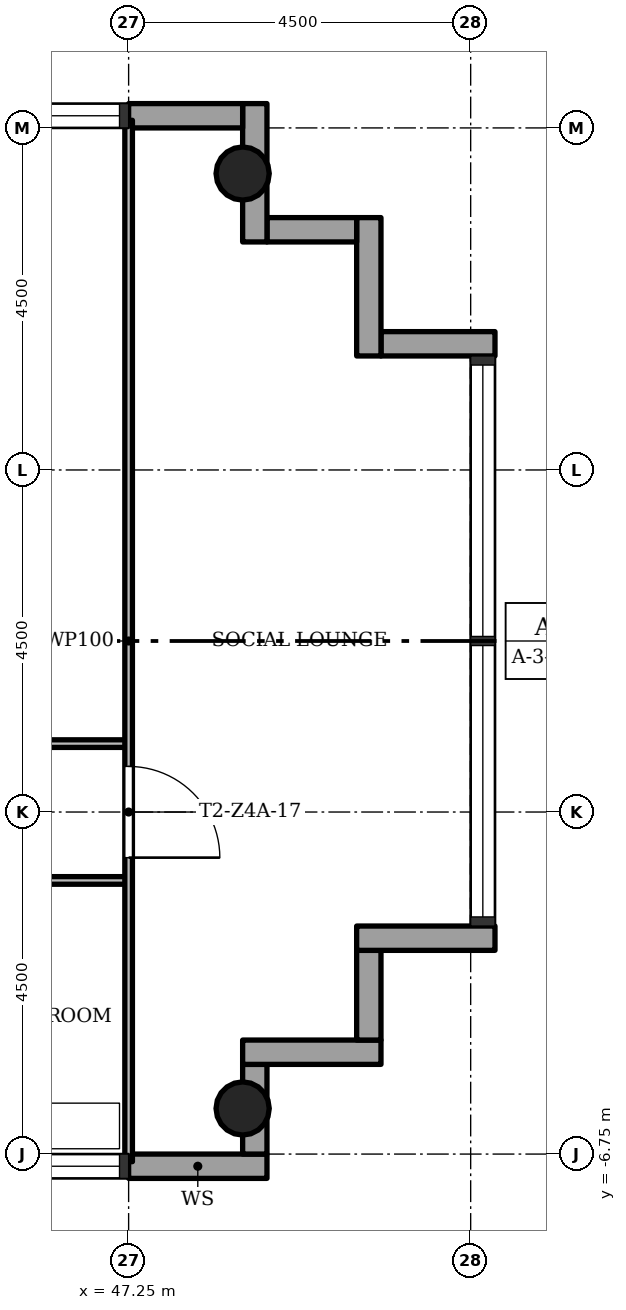
"""IFC4 building model, lengths in metres.
Left out: names, types, materials, properties, quantities, classifications, styles, units other than length and angle.
Written with IfcOpenShell. Run it as: python <this file> out.ifc"""

import sys

from ifc_helpers import new_model, si_unit, direction, frame, frame_2d, origin, origin_2d, place, context, subcontext, project, spatial, rectangle, hollow_circle, extrude, element, fill, save


model = new_model("IFC4")
c1 = context("Model", 3, precision=1e-05, world=origin(), true_north=direction((0.0, 1.0)))
c2 = subcontext(c1, "Body", "Model", "MODEL_VIEW")
j1 = project(units=[si_unit("LENGTHUNIT", "METRE"), si_unit("PLANEANGLEUNIT", "RADIAN")], contexts=[c1])
p1 = place(None, origin())
s1 = spatial("IfcSite", under=j1, at=p1, CompositionType="ELEMENT")
p2 = place(p1, origin())
s2 = spatial("IfcBuilding", under=s1, at=p2, CompositionType="ELEMENT")
p3 = place(p2, frame((0.0, 0.0, 226.6)))
s3 = spatial("IfcBuildingStorey", under=s2, at=p3, CompositionType="ELEMENT", Elevation=226.6)
for number, where, z_axis, x_axis in (
    (1, (48.75, -6.15, 0.0), (0.0, 0.0, 1.0), (1.0, 0.0, 0.0)),
    (2, (48.75, 6.15, 0.0), (0.0, 0.0, 1.0), (1.0, 0.0, 0.0)),
):
    element("IfcColumn", number, at=place(p3, frame(where, z_axis=z_axis, x_axis=x_axis)), inside=s3, PredefinedType="COLUMN", context=c2, shape_type="SweptSolid", body=[
        extrude(hollow_circle(Radius=0.35, WallThickness=0.025, at=origin_2d()), origin(), (0.0, 0.0, 1.0), 3.4),
    ])
p4 = place(p3, frame((47.25, -6.91, -0.3), z_axis=(0.0, 0.0, 1.0), x_axis=(1.0, 0.0, 0.0)))
e3 = element("IfcWall", 3, at=p4, inside=s3, PredefinedType="STANDARD", context=c2, shape_type="SweptSolid", body=[
    extrude(rectangle(XDim=1.82, YDim=0.32, at=frame_2d((0.91, 0.0))), origin(), (0.0, 0.0, 1.0), 3.4),
])
p5 = place(p3, frame((48.91, -6.75, -0.3), z_axis=(0.0, 0.0, 1.0), x_axis=(0.0, 1.0, 0.0)))
e4 = element("IfcWall", 4, at=p5, inside=s3, PredefinedType="STANDARD", context=c2, shape_type="SweptSolid", body=[
    extrude(rectangle(XDim=1.18, YDim=0.32, at=frame_2d((0.59, 0.0))), origin(), (0.0, 0.0, 1.0), 3.4),
])
p6 = place(p3, frame((48.75, -5.41, -0.3), z_axis=(0.0, 0.0, 1.0), x_axis=(1.0, 0.0, 0.0)))
e5 = element("IfcWall", 5, at=p6, inside=s3, PredefinedType="STANDARD", context=c2, shape_type="SweptSolid", body=[
    extrude(rectangle(XDim=1.82, YDim=0.32, at=frame_2d((0.91, 0.0))), origin(), (0.0, 0.0, 1.0), 3.4),
])
p7 = place(p3, frame((50.41, -5.25, -0.3), z_axis=(0.0, 0.0, 1.0), x_axis=(0.0, 1.0, 0.0)))
e6 = element("IfcWall", 6, at=p7, inside=s3, PredefinedType="STANDARD", context=c2, shape_type="SweptSolid", body=[
    extrude(rectangle(XDim=1.18, YDim=0.32, at=frame_2d((0.59, 0.0))), origin(), (0.0, 0.0, 1.0), 3.4),
])
p8 = place(p3, frame((50.25, -3.91, -0.3), z_axis=(0.0, 0.0, 1.0), x_axis=(1.0, 0.0, 0.0)))
e7 = element("IfcWall", 7, at=p8, inside=s3, PredefinedType="STANDARD", context=c2, shape_type="SweptSolid", body=[
    extrude(rectangle(XDim=1.82, YDim=0.32, at=frame_2d((0.91, 0.0))), origin(), (0.0, 0.0, 1.0), 3.4),
])
p9 = place(p3, frame((52.07, 3.91, -0.3), z_axis=(0.0, 0.0, 1.0), x_axis=(-1.0, 0.0, 0.0)))
e8 = element("IfcWall", 8, at=p9, inside=s3, PredefinedType="STANDARD", context=c2, shape_type="SweptSolid", body=[
    extrude(rectangle(XDim=1.5, YDim=0.32, at=frame_2d((0.75, 0.0))), origin(), (0.0, 0.0, 1.0), 3.4),
])
p10 = place(p3, frame((50.41, 3.75, -0.3), z_axis=(0.0, 0.0, 1.0), x_axis=(0.0, 1.0, 0.0)))
e9 = element("IfcWall", 9, at=p10, inside=s3, PredefinedType="STANDARD", context=c2, shape_type="SweptSolid", body=[
    extrude(rectangle(XDim=1.82, YDim=0.32, at=frame_2d((0.91, 0.0))), origin(), (0.0, 0.0, 1.0), 3.4),
])
p11 = place(p3, frame((50.25, 5.41, -0.3), z_axis=(0.0, 0.0, 1.0), x_axis=(-1.0, 0.0, 0.0)))
e10 = element("IfcWall", 10, at=p11, inside=s3, PredefinedType="STANDARD", context=c2, shape_type="SweptSolid", body=[
    extrude(rectangle(XDim=1.18, YDim=0.32, at=frame_2d((0.59, 0.0))), origin(), (0.0, 0.0, 1.0), 3.4),
])
p12 = place(p3, frame((48.91, 5.25, -0.3), z_axis=(0.0, 0.0, 1.0), x_axis=(0.0, 1.0, 0.0)))
e11 = element("IfcWall", 11, at=p12, inside=s3, PredefinedType="STANDARD", context=c2, shape_type="SweptSolid", body=[
    extrude(rectangle(XDim=1.82, YDim=0.32, at=frame_2d((0.91, 0.0))), origin(), (0.0, 0.0, 1.0), 3.4),
])
p13 = place(p3, frame((48.75, 6.91, -0.3), z_axis=(0.0, 0.0, 1.0), x_axis=(-1.0, 0.0, 0.0)))
e12 = element("IfcWall", 12, at=p13, inside=s3, PredefinedType="STANDARD", context=c2, shape_type="SweptSolid", body=[
    extrude(rectangle(XDim=1.5, YDim=0.32, at=frame_2d((0.75, 0.0))), origin(), (0.0, 0.0, 1.0), 3.4),
])
p14 = place(p3, frame((47.25, -3.15, 0.0), z_axis=(0.0, 0.0, 1.0), x_axis=(-1.0, 0.0, 0.0)))
e13 = element("IfcWall", 13, at=p14, inside=s3, PredefinedType="PARTITIONING", context=c2, shape_type="SweptSolid", body=[
    extrude(rectangle(XDim=4.5, YDim=0.1, at=frame_2d((2.25, 0.0))), origin(), (0.0, 0.0, 1.0), 3.0),
])
p15 = place(p14, frame((1.8, 0.0, 0.0)))
e14 = element("IfcOpeningElement", 14, at=p15, cuts=e13, PredefinedType="OPENING", context=c2, shape_type="SweptSolid", body=[
    extrude(rectangle(XDim=0.9, YDim=2.1, at=frame_2d((0.45, 1.05))), frame((0.0, 0.06, 0.0), z_axis=(0.0, -1.0, 0.0), x_axis=(1.0, 0.0, 0.0)), (0.0, 0.0, 1.0), 0.12),
])
p16 = place(p3, frame((47.25, -1.35, 0.0), z_axis=(0.0, 0.0, 1.0), x_axis=(-1.0, 0.0, 0.0)))
e15 = element("IfcWall", 15, at=p16, inside=s3, PredefinedType="PARTITIONING", context=c2, shape_type="SweptSolid", body=[
    extrude(rectangle(XDim=2.7, YDim=0.1, at=frame_2d((1.35, 0.0))), origin(), (0.0, 0.0, 1.0), 3.0),
])
p17 = place(p16, frame((1.73, 0.0, 0.0)))
e16 = element("IfcOpeningElement", 16, at=p17, cuts=e15, PredefinedType="OPENING", context=c2, shape_type="SweptSolid", body=[
    extrude(rectangle(XDim=0.9, YDim=2.1, at=frame_2d((0.45, 1.05))), frame((0.0, 0.06, 0.0), z_axis=(0.0, -1.0, 0.0), x_axis=(1.0, 0.0, 0.0)), (0.0, 0.0, 1.0), 0.12),
])
p18 = place(p3, frame((47.25, -6.85, 0.0), z_axis=(0.0, 0.0, 1.0), x_axis=(0.0, 1.0, 0.0)))
e17 = element("IfcWall", 17, at=p18, inside=s3, PredefinedType="PARTITIONING", context=c2, shape_type="SweptSolid", body=[
    extrude(rectangle(XDim=13.7, YDim=0.1, at=frame_2d((6.85, 0.0))), origin(), (0.0, 0.0, 1.0), 3.0),
])
p19 = place(p18, frame((4.0, 0.0, 0.0)))
e18 = element("IfcOpeningElement", 18, at=p19, cuts=e17, PredefinedType="OPENING", context=c2, shape_type="SweptSolid", body=[
    extrude(rectangle(XDim=1.2, YDim=2.1, at=frame_2d((0.6, 1.05))), frame((0.0, 0.06, 0.0), z_axis=(0.0, -1.0, 0.0), x_axis=(1.0, 0.0, 0.0)), (0.0, 0.0, 1.0), 0.12),
])
p20 = place(p19, origin())
e19 = element("IfcDoor", 19, at=p20, inside=s3, OperationType="SINGLE_SWING_LEFT", PredefinedType="DOOR", context=c2, shape_type="SweptSolid", body=[
    extrude(rectangle(XDim=1.2, YDim=2.1, at=frame_2d((0.6, 1.05))), frame((0.0, 0.025, 0.0), z_axis=(0.0, -1.0, 0.0), x_axis=(1.0, 0.0, 0.0)), (0.0, 0.0, 1.0), 0.05),
])
fill(e18, e19)
save(model, sys.argv[1])
